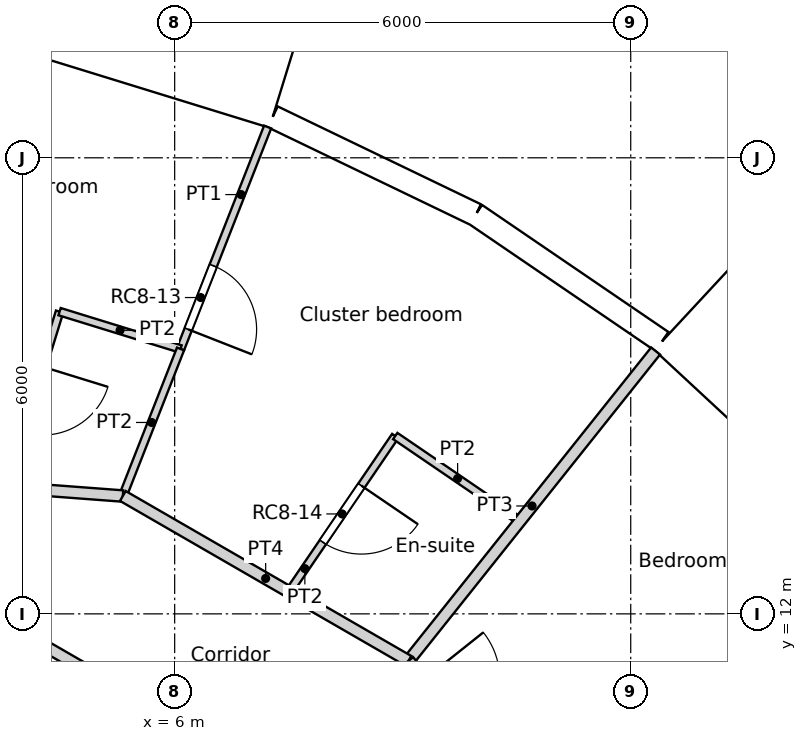
"""IFC4 building model, lengths in metres.
Left out: names, types, materials, properties, quantities, classifications, styles, units other than length and angle.
Written with IfcOpenShell. Run it as: python <this file> out.ifc"""

import sys

from ifc_helpers import new_model, si_unit, direction, frame, frame_2d, origin, origin_2d, place, context, subcontext, project, spatial, rectangle, circle, extrude, element, fill, save


model = new_model("IFC4")
c1 = context("Model", 3, precision=1e-05, world=origin(), true_north=direction((0.0, 1.0)))
c2 = subcontext(c1, "Body", "Model", "MODEL_VIEW")
j1 = project(units=[si_unit("LENGTHUNIT", "METRE"), si_unit("PLANEANGLEUNIT", "RADIAN")], contexts=[c1])
p1 = place(None, origin())
s1 = spatial("IfcSite", under=j1, at=p1, CompositionType="ELEMENT")
p2 = place(p1, origin())
s2 = spatial("IfcBuilding", under=s1, at=p2, CompositionType="ELEMENT")
p3 = place(p2, frame((0.0, 0.0, 305.4)))
s3 = spatial("IfcBuildingStorey", under=s2, at=p3, CompositionType="ELEMENT", Elevation=305.4)
for number, where, z_axis, x_axis in (
    (1, (11.735, 14.716, 0.0), (0.0, 0.0, 1.0), (1.0, 0.0, 0.0)),
    (2, (6.876, 17.521, 0.0), (0.0, 0.0, 1.0), (1.0, 0.0, 0.0)),
):
    element("IfcColumn", number, at=place(p3, frame(where, z_axis=z_axis, x_axis=x_axis)), inside=s3, PredefinedType="COLUMN", context=c2, shape_type="SweptSolid", body=[
        extrude(circle(Radius=0.45, at=origin_2d()), origin(), (0.0, 0.0, 1.0), 3.6),
    ])
p4 = place(p3, frame((15.003, 13.964, -0.35), z_axis=(0.0, 0.0, 1.0), x_axis=(-0.733022439167, 0.680204457261, 0.0)))
e3 = element("IfcWall", 3, at=p4, inside=s3, PredefinedType="ELEMENTEDWALL", context=c2, shape_type="SweptSolid", body=[
    extrude(rectangle(XDim=3.0, YDim=1.45, at=frame_2d((1.5, 0.0))), origin(), (0.0, 0.0, 1.0), 3.6),
])
p5 = place(p4, frame((1.5, 0.0, 1.9)))
e4 = element("IfcOpeningElement", 4, at=p5, cuts=e3, PredefinedType="OPENING", context=c2, shape_type="SweptSolid", body=[
    extrude(circle(Radius=0.9, at=origin_2d()), frame((0.0, 0.735, 0.0), z_axis=(0.0, -1.0, 0.0), x_axis=(1.0, 0.0, 0.0)), (0.0, 0.0, 1.0), 1.47),
])
p6 = place(p3, frame((12.408, 15.584, 0.0), z_axis=(0.0, 0.0, 1.0), x_axis=(-0.826236061068, 0.563324037646, 0.0)))
e5 = element("IfcWall", 5, at=p6, inside=s3, PredefinedType="SOLIDWALL", context=c2, shape_type="SweptSolid", body=[
    extrude(rectangle(XDim=2.962, YDim=0.3, at=frame_2d((1.481, 0.0))), origin(), (0.0, 0.0, 1.0), 2.8),
])
p7 = place(p6, frame((1.481, 0.0, 1.55)))
e6 = element("IfcOpeningElement", 6, at=p7, cuts=e5, PredefinedType="OPENING", context=c2, shape_type="SweptSolid", body=[
    extrude(circle(Radius=0.9, at=origin_2d()), frame((0.0, 0.16, 0.0), z_axis=(0.0, -1.0, 0.0), x_axis=(1.0, 0.0, 0.0)), (0.0, 0.0, 1.0), 0.32),
])
p8 = place(p3, frame((9.961, 17.253, 0.0), z_axis=(0.0, 0.0, 1.0), x_axis=(-0.90095513435, 0.433912255978, 0.0)))
e7 = element("IfcWall", 7, at=p8, inside=s3, PredefinedType="SOLIDWALL", context=c2, shape_type="SweptSolid", body=[
    extrude(rectangle(XDim=2.962, YDim=0.3, at=frame_2d((1.481, 0.0))), origin(), (0.0, 0.0, 1.0), 3.25),
])
p9 = place(p8, frame((1.481, 0.0, 1.55)))
e8 = element("IfcOpeningElement", 8, at=p9, cuts=e7, PredefinedType="OPENING", context=c2, shape_type="SweptSolid", body=[
    extrude(circle(Radius=0.9, at=origin_2d()), frame((0.0, 0.16, 0.0), z_axis=(0.0, -1.0, 0.0), x_axis=(1.0, 0.0, 0.0)), (0.0, 0.0, 1.0), 0.32),
])
p10 = place(p3, frame((7.458, 19.091, -0.35), z_axis=(0.0, 0.0, 1.0), x_axis=(-0.955571139978, 0.294760574774, 0.0)))
e9 = element("IfcWall", 9, at=p10, inside=s3, PredefinedType="ELEMENTEDWALL", context=c2, shape_type="SweptSolid", body=[
    extrude(rectangle(XDim=3.0, YDim=1.45, at=frame_2d((1.5, 0.0))), origin(), (0.0, 0.0, 1.0), 3.6),
])
p11 = place(p10, frame((1.5, 0.0, 1.9)))
e10 = element("IfcOpeningElement", 10, at=p11, cuts=e9, PredefinedType="OPENING", context=c2, shape_type="SweptSolid", body=[
    extrude(circle(Radius=0.9, at=origin_2d()), frame((0.0, 0.735, 0.0), z_axis=(0.0, -1.0, 0.0), x_axis=(1.0, 0.0, 0.0)), (0.0, 0.0, 1.0), 1.47),
])
p12 = place(p3, frame((4.418, 19.425, 0.0), z_axis=(0.0, 0.0, 1.0), x_axis=(-0.988835775663, 0.149009425104, 0.0)))
e11 = element("IfcWall", 11, at=p12, inside=s3, PredefinedType="SOLIDWALL", context=c2, shape_type="SweptSolid", body=[
    extrude(rectangle(XDim=2.962, YDim=0.3, at=frame_2d((1.481, 0.0))), origin(), (0.0, 0.0, 1.0), 2.8),
])
p13 = place(p12, frame((1.481, 0.0, 1.55)))
e12 = element("IfcOpeningElement", 12, at=p13, cuts=e11, PredefinedType="OPENING", context=c2, shape_type="SweptSolid", body=[
    extrude(circle(Radius=0.9, at=origin_2d()), frame((0.0, 0.16, 0.0), z_axis=(0.0, -1.0, 0.0), x_axis=(1.0, 0.0, 0.0)), (0.0, 0.0, 1.0), 0.32),
])
p14 = place(p3, frame((9.079, 11.384, 0.0), z_axis=(0.0, 0.0, 1.0), x_axis=(0.623165080354, -0.782090328944, 0.0)))
e13 = element("IfcWall", 13, at=p14, inside=s3, PredefinedType="PARTITIONING", context=c2, shape_type="SweptSolid", body=[
    extrude(rectangle(XDim=3.564, YDim=0.15, at=frame_2d((1.782, 0.0))), origin(), (0.0, 0.0, 1.0), 3.25),
])
p15 = place(p14, frame((0.32, 0.0, 0.0)))
e14 = element("IfcOpeningElement", 14, at=p15, cuts=e13, PredefinedType="OPENING", context=c2, shape_type="SweptSolid", body=[
    extrude(rectangle(XDim=1.0, YDim=2.1, at=frame_2d((0.5, 1.05))), frame((0.0, 0.075, 0.0), z_axis=(0.0, -1.0, 0.0), x_axis=(1.0, 0.0, 0.0)), (0.0, 0.0, 1.0), 0.15),
])
p16 = place(p3, frame((3.261, 12.171, 0.0), z_axis=(0.0, 0.0, 1.0), x_axis=(0.866066809554, -0.499928276245, 0.0)))
e15 = element("IfcWall", 15, at=p16, inside=s3, PredefinedType="PARTITIONING", context=c2, shape_type="SweptSolid", body=[
    extrude(rectangle(XDim=6.743, YDim=0.15, at=frame_2d((3.371, 0.0))), origin(), (0.0, 0.0, 1.0), 3.25),
])
p17 = place(p3, frame((-3.239, 14.193, 0.0), z_axis=(0.0, 0.0, 1.0), x_axis=(0.997187999346, -0.074940602878, 0.0)))
e16 = element("IfcWall", 16, at=p17, inside=s3, PredefinedType="PARTITIONING", context=c2, shape_type="SweptSolid", body=[
    extrude(rectangle(XDim=8.581, YDim=0.15, at=frame_2d((4.291, 0.0))), origin(), (0.0, 0.0, 1.0), 3.25),
])
p18 = place(p17, frame((5.111, 0.0, 0.0)))
e17 = element("IfcOpeningElement", 17, at=p18, cuts=e16, PredefinedType="OPENING", context=c2, shape_type="SweptSolid", body=[
    extrude(rectangle(XDim=1.1, YDim=2.1, at=frame_2d((0.55, 1.05))), frame((0.0, 0.075, 0.0), z_axis=(0.0, -1.0, 0.0), x_axis=(1.0, 0.0, 0.0)), (0.0, 0.0, 1.0), 0.15),
])
p19 = place(p3, frame((5.318, 13.551, 0.0), z_axis=(0.0, 0.0, 1.0), x_axis=(0.865990693744, -0.500060114735, 0.0)))
e18 = element("IfcWall", 18, at=p19, inside=s3, PredefinedType="PARTITIONING", context=c2, shape_type="SweptSolid", body=[
    extrude(rectangle(XDim=4.339, YDim=0.15, at=frame_2d((2.17, 0.0))), origin(), (0.0, 0.0, 1.0), 3.25),
])
p20 = place(p3, frame((9.076, 11.381, 0.0), z_axis=(0.0, 0.0, 1.0), x_axis=(0.623409504508, 0.781895510723, 0.0)))
e19 = element("IfcWall", 19, at=p20, inside=s3, PredefinedType="PARTITIONING", context=c2, shape_type="SweptSolid", body=[
    extrude(rectangle(XDim=5.214, YDim=0.15, at=frame_2d((2.607, 0.0))), origin(), (0.0, 0.0, 1.0), 3.25),
])
p21 = place(p3, frame((4.486, 15.976, 0.0), z_axis=(0.0, 0.0, 1.0), x_axis=(0.955528179313, -0.294899811019, 0.0)))
e20 = element("IfcWall", 20, at=p21, inside=s3, PredefinedType="PARTITIONING", context=c2, shape_type="SweptSolid", body=[
    extrude(rectangle(XDim=1.665, YDim=0.1, at=frame_2d((0.833, 0.0))), origin(), (0.0, 0.0, 1.0), 3.25),
])
p22 = place(p3, frame((3.773, 13.667, 0.0), z_axis=(0.0, 0.0, 1.0), x_axis=(0.295086629105, 0.955470502592, 0.0)))
e21 = element("IfcWall", 21, at=p22, inside=s3, PredefinedType="PARTITIONING", context=c2, shape_type="SweptSolid", body=[
    extrude(rectangle(XDim=2.417, YDim=0.1, at=frame_2d((1.208, 0.0))), origin(), (0.0, 0.0, 1.0), 3.25),
])
p23 = place(p22, frame((0.759, 0.0, 0.0)))
e22 = element("IfcOpeningElement", 22, at=p23, cuts=e21, PredefinedType="OPENING", context=c2, shape_type="SweptSolid", body=[
    extrude(rectangle(XDim=0.9, YDim=2.0, at=frame_2d((0.45, 1.0))), frame((0.0, 0.05, 0.0), z_axis=(0.0, -1.0, 0.0), x_axis=(1.0, 0.0, 0.0)), (0.0, 0.0, 1.0), 0.1),
])
p24 = place(p3, frame((6.077, 15.485, 0.0), z_axis=(0.0, 0.0, 1.0), x_axis=(0.365344119851, 0.93087253375, 0.0)))
e23 = element("IfcWall", 23, at=p24, inside=s3, PredefinedType="PARTITIONING", context=c2, shape_type="SweptSolid", body=[
    extrude(rectangle(XDim=3.137, YDim=0.1, at=frame_2d((1.568, 0.0))), origin(), (0.0, 0.0, 1.0), 3.25),
])
p25 = place(p24, frame((0.277, 0.0, 0.0)))
e24 = element("IfcOpeningElement", 24, at=p25, cuts=e23, PredefinedType="OPENING", context=c2, shape_type="SweptSolid", body=[
    extrude(rectangle(XDim=0.9, YDim=2.1, at=frame_2d((0.45, 1.05))), frame((0.0, 0.05, 0.0), z_axis=(0.0, -1.0, 0.0), x_axis=(1.0, 0.0, 0.0)), (0.0, 0.0, 1.0), 0.1),
])
p26 = place(p3, frame((5.318, 13.551, 0.0), z_axis=(0.0, 0.0, 1.0), x_axis=(0.365223322063, 0.930919934807, 0.0)))
e25 = element("IfcWall", 25, at=p26, inside=s3, PredefinedType="PARTITIONING", context=c2, shape_type="SweptSolid", body=[
    extrude(rectangle(XDim=2.078, YDim=0.1, at=frame_2d((1.039, 0.0))), origin(), (0.0, 0.0, 1.0), 3.25),
])
p27 = place(p3, frame((8.902, 14.34, 0.0), z_axis=(0.0, 0.0, 1.0), x_axis=(0.826141514998, -0.563462684831, 0.0)))
e26 = element("IfcWall", 26, at=p27, inside=s3, PredefinedType="PARTITIONING", context=c2, shape_type="SweptSolid", body=[
    extrude(rectangle(XDim=1.986, YDim=0.1, at=frame_2d((0.993, 0.0))), origin(), (0.0, 0.0, 1.0), 3.25),
])
p28 = place(p3, frame((7.504, 12.289, 0.0), z_axis=(0.0, 0.0, 1.0), x_axis=(0.563272733387, 0.826271037749, 0.0)))
e27 = element("IfcWall", 27, at=p28, inside=s3, PredefinedType="PARTITIONING", context=c2, shape_type="SweptSolid", body=[
    extrude(rectangle(XDim=2.482, YDim=0.1, at=frame_2d((1.241, 0.0))), origin(), (0.0, 0.0, 1.0), 3.25),
])
p29 = place(p28, frame((0.791, 0.0, 0.0)))
e28 = element("IfcOpeningElement", 28, at=p29, cuts=e27, PredefinedType="OPENING", context=c2, shape_type="SweptSolid", body=[
    extrude(rectangle(XDim=0.9, YDim=2.04, at=frame_2d((0.45, 1.02))), frame((0.0, 0.05, 0.0), z_axis=(0.0, -1.0, 0.0), x_axis=(1.0, 0.0, 0.0)), (0.0, 0.0, 1.0), 0.1),
])
p30 = place(p5, origin())
e29 = element("IfcWindow", 29, at=p30, inside=s3, PartitioningType="SINGLE_PANEL", PredefinedType="WINDOW", context=c2, shape_type="SweptSolid", body=[
    extrude(circle(Radius=0.9, at=origin_2d()), frame((0.0, 0.695, 0.0), z_axis=(0.0, -1.0, 0.0), x_axis=(1.0, 0.0, 0.0)), (0.0, 0.0, 1.0), 0.1),
])
fill(e4, e29)
p31 = place(p7, origin())
e30 = element("IfcWindow", 30, at=p31, inside=s3, PartitioningType="SINGLE_PANEL", PredefinedType="WINDOW", context=c2, shape_type="SweptSolid", body=[
    extrude(circle(Radius=0.9, at=origin_2d()), frame((0.0, 0.12, 0.0), z_axis=(0.0, -1.0, 0.0), x_axis=(1.0, 0.0, 0.0)), (0.0, 0.0, 1.0), 0.1),
])
fill(e6, e30)
p32 = place(p9, origin())
e31 = element("IfcWindow", 31, at=p32, inside=s3, PartitioningType="SINGLE_PANEL", PredefinedType="WINDOW", context=c2, shape_type="SweptSolid", body=[
    extrude(circle(Radius=0.9, at=origin_2d()), frame((0.0, 0.12, 0.0), z_axis=(0.0, -1.0, 0.0), x_axis=(1.0, 0.0, 0.0)), (0.0, 0.0, 1.0), 0.1),
])
fill(e8, e31)
p33 = place(p11, origin())
e32 = element("IfcWindow", 32, at=p33, inside=s3, PartitioningType="SINGLE_PANEL", PredefinedType="WINDOW", context=c2, shape_type="SweptSolid", body=[
    extrude(circle(Radius=0.9, at=origin_2d()), frame((0.0, 0.695, 0.0), z_axis=(0.0, -1.0, 0.0), x_axis=(1.0, 0.0, 0.0)), (0.0, 0.0, 1.0), 0.1),
])
fill(e10, e32)
p34 = place(p25, origin())
e33 = element("IfcDoor", 33, at=p34, inside=s3, OperationType="SINGLE_SWING_RIGHT", PredefinedType="DOOR", context=c2, shape_type="SweptSolid", body=[
    extrude(rectangle(XDim=0.9, YDim=2.1, at=frame_2d((0.45, 1.05))), frame((0.0, 0.025, 0.0), z_axis=(0.0, -1.0, 0.0), x_axis=(1.0, 0.0, 0.0)), (0.0, 0.0, 1.0), 0.05),
])
fill(e24, e33)
p35 = place(p29, origin())
e34 = element("IfcDoor", 34, at=p35, inside=s3, OperationType="SINGLE_SWING_LEFT", PredefinedType="DOOR", context=c2, shape_type="SweptSolid", body=[
    extrude(rectangle(XDim=0.9, YDim=2.04, at=frame_2d((0.45, 1.02))), frame((0.0, 0.025, 0.0), z_axis=(0.0, -1.0, 0.0), x_axis=(1.0, 0.0, 0.0)), (0.0, 0.0, 1.0), 0.05),
])
fill(e28, e34)
save(model, sys.argv[1])
